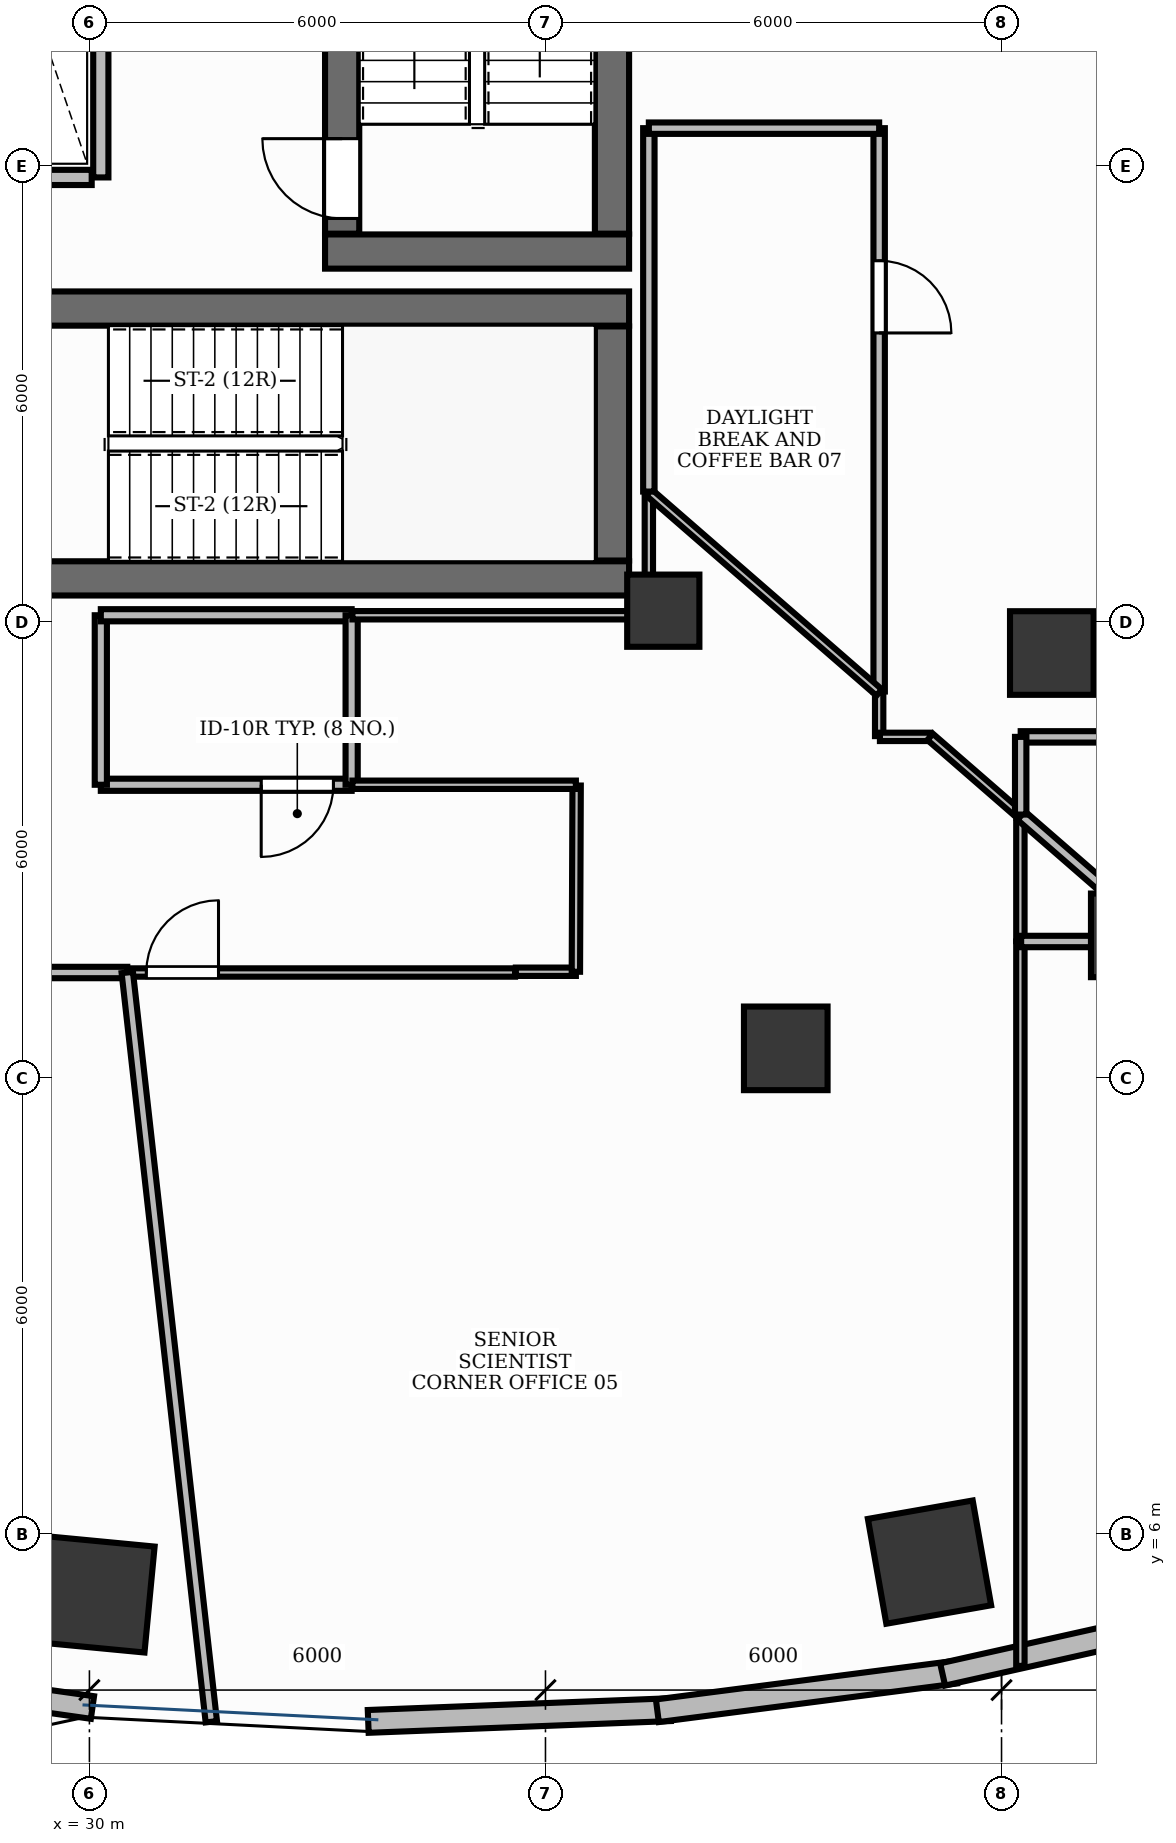
"""IFC4 building model, lengths in metres.
Left out: names, types, materials, properties, quantities, classifications, styles, units other than length and angle.
Written with IfcOpenShell. Run it as: python <this file> out.ifc"""

import sys

from ifc_helpers import new_model, si_unit, direction, frame, frame_2d, origin, origin_2d, place, context, subcontext, project, spatial, rectangle, extrude, element, fill, save


model = new_model("IFC4")
c1 = context("Model", 3, precision=1e-05, world=origin(), true_north=direction((0.0, 1.0)))
c2 = subcontext(c1, "Body", "Model", "MODEL_VIEW")
j1 = project(units=[si_unit("LENGTHUNIT", "METRE"), si_unit("PLANEANGLEUNIT", "RADIAN")], contexts=[c1])
p1 = place(None, origin())
s1 = spatial("IfcSite", under=j1, at=p1, CompositionType="ELEMENT")
p2 = place(p1, origin())
s2 = spatial("IfcBuilding", under=s1, at=p2, CompositionType="ELEMENT")
p3 = place(p2, frame((0.0, 0.0, 76.2)))
s3 = spatial("IfcBuildingStorey", under=s2, at=p3, CompositionType="ELEMENT", Elevation=76.2)
p4 = place(p3, frame((28.852, 18.575, 0.0), z_axis=(0.0, 0.0, 1.0), x_axis=(1.0, 0.0, 0.0)))
e1 = element("IfcWall", 1, at=p4, inside=s3, PredefinedType="SHEAR", context=c2, shape_type="SweptSolid", body=[
    extrude(rectangle(XDim=8.248, YDim=0.45, at=frame_2d((4.124, 0.0))), origin(), (0.0, 0.0, 1.0), 3.9),
])
p5 = place(p3, frame((28.35, 22.125, 0.0), z_axis=(0.0, 0.0, 1.0), x_axis=(1.0, 0.0, 0.0)))
e2 = element("IfcWall", 2, at=p5, inside=s3, PredefinedType="SHEAR", context=c2, shape_type="SweptSolid", body=[
    extrude(rectangle(XDim=8.75, YDim=0.45, at=frame_2d((4.375, 0.0))), origin(), (0.0, 0.0, 1.0), 3.9),
])
p6 = place(p3, frame((36.875, 18.81, 0.0), z_axis=(0.0, 0.0, 1.0), x_axis=(0.0, 1.0, 0.0)))
e3 = element("IfcWall", 3, at=p6, inside=s3, PredefinedType="SHEAR", context=c2, shape_type="SweptSolid", body=[
    extrude(rectangle(XDim=3.08, YDim=0.45, at=frame_2d((1.54, 0.0))), origin(), (0.0, 0.0, 1.0), 3.9),
])
p7 = place(p3, frame((33.1, 22.875, 0.0), z_axis=(0.0, 0.0, 1.0), x_axis=(1.0, 0.0, 0.0)))
e4 = element("IfcWall", 4, at=p7, inside=s3, PredefinedType="SHEAR", context=c2, shape_type="SweptSolid", body=[
    extrude(rectangle(XDim=4.0, YDim=0.45, at=frame_2d((2.0, 0.0))), origin(), (0.0, 0.0, 1.0), 3.9),
])
p8 = place(p3, frame((36.875, 23.11, 0.0), z_axis=(0.0, 0.0, 1.0), x_axis=(0.0, 1.0, 0.0)))
e5 = element("IfcWall", 5, at=p8, inside=s3, PredefinedType="SHEAR", context=c2, shape_type="SweptSolid", body=[
    extrude(rectangle(XDim=7.78, YDim=0.45, at=frame_2d((3.89, 0.0))), origin(), (0.0, 0.0, 1.0), 3.9),
])
p9 = place(p3, frame((33.325, 23.11, 0.0), z_axis=(0.0, 0.0, 1.0), x_axis=(0.0, 1.0, 0.0)))
e6 = element("IfcWall", 6, at=p9, inside=s3, PredefinedType="SHEAR", context=c2, shape_type="SweptSolid", body=[
    extrude(rectangle(XDim=7.78, YDim=0.45, at=frame_2d((3.89, 0.0))), origin(), (0.0, 0.0, 1.0), 3.9),
])
p10 = place(p9, frame((0.2, 0.0, 0.0)))
e7 = element("IfcOpeningElement", 7, at=p10, cuts=e6, PredefinedType="OPENING", context=c2, shape_type="SweptSolid", body=[
    extrude(rectangle(XDim=1.05, YDim=2.15, at=frame_2d((0.525, 1.075))), frame((0.0, 0.24, 0.0), z_axis=(0.0, -1.0, 0.0), x_axis=(1.0, 0.0, 0.0)), (0.0, 0.0, 1.0), 0.48),
])
p11 = place(p3, frame((37.55, 18.15, -0.0), z_axis=(0.0, 0.0, 1.0), x_axis=(1.0, 0.0, 0.0)))
e8 = element("IfcColumn", 8, at=p11, inside=s3, PredefinedType="PILASTER", context=c2, shape_type="SweptSolid", body=[
    extrude(rectangle(XDim=0.95, YDim=0.95, at=origin_2d()), origin(), (0.0, 0.0, 1.0), 3.901),
])
for number, where, z_axis, x_axis in (
    (9, (30.094, 5.208, -0.0), (0.0, 0.0, 1.0), (-0.995, 0.095, 0.0)),
    (10, (41.052, 5.633, -0.0), (0.0, 0.0, 1.0), (0.985, 0.173, 0.0)),
):
    element("IfcColumn", number, at=place(p3, frame(where, z_axis=z_axis, x_axis=x_axis)), inside=s3, PredefinedType="COLUMN", context=c2, shape_type="SweptSolid", body=[
        extrude(rectangle(XDim=1.4, YDim=1.4, at=origin_2d()), origin(), (0.0, 0.0, 1.0), 3.901),
    ])
for number, where, z_axis, x_axis in (
    (11, (39.161, 12.392, -0.0), (0.0, 0.0, 1.0), (1.0, 0.0, 0.0)),
    (12, (43.727, 13.879, -0.0), (0.0, 0.0, 1.0), (1.0, 0.0, 0.0)),
    (13, (42.662, 17.593, -0.0), (0.0, 0.0, 1.0), (1.0, 0.0, 0.0)),
):
    element("IfcColumn", number, at=place(p3, frame(where, z_axis=z_axis, x_axis=x_axis)), inside=s3, PredefinedType="COLUMN", context=c2, shape_type="SweptSolid", body=[
        extrude(rectangle(XDim=1.1, YDim=1.1, at=origin_2d()), origin(), (0.0, 0.0, 1.0), 3.901),
    ])
p12 = place(p3, frame((26.128, 4.273, 0.0), z_axis=(0.0, 0.0, 1.0), x_axis=(0.990165832998, -0.139898617443, 0.0)))
e14 = element("IfcWall", 14, at=p12, inside=s3, PredefinedType="STANDARD", context=c2, shape_type="SweptSolid", body=[
    extrude(rectangle(XDim=3.951, YDim=0.3, at=frame_2d((1.976, 0.0))), origin(), (0.0, 0.0, 1.0), 3.9),
])
p13 = place(p3, frame((33.668, 3.538, 0.0), z_axis=(0.0, 0.0, 1.0), x_axis=(0.999245411623, 0.038840794937, 0.0)))
e15 = element("IfcWall", 15, at=p13, inside=s3, PredefinedType="STANDARD", context=c2, shape_type="SweptSolid", body=[
    extrude(rectangle(XDim=3.979, YDim=0.3, at=frame_2d((1.989, 0.0))), origin(), (0.0, 0.0, 1.0), 3.9),
])
p14 = place(p3, frame((37.472, 3.678, 0.0), z_axis=(0.0, 0.0, 1.0), x_axis=(0.991734095036, 0.128310111617, 0.0)))
e16 = element("IfcWall", 16, at=p14, inside=s3, PredefinedType="STANDARD", context=c2, shape_type="SweptSolid", body=[
    extrude(rectangle(XDim=3.956, YDim=0.3, at=frame_2d((1.978, 0.0))), origin(), (0.0, 0.0, 1.0), 3.9),
])
p15 = place(p3, frame((41.225, 4.155, 0.0), z_axis=(0.0, 0.0, 1.0), x_axis=(0.975868573345, 0.218358713032, 0.0)))
e17 = element("IfcWall", 17, at=p15, inside=s3, PredefinedType="STANDARD", context=c2, shape_type="SweptSolid", body=[
    extrude(rectangle(XDim=3.909, YDim=0.3, at=frame_2d((1.954, 0.0))), origin(), (0.0, 0.0, 1.0), 3.9),
])
p16 = place(p3, frame((30.15, 23.85, 0.0), z_axis=(0.0, 0.0, 1.0), x_axis=(0.0, 1.0, 0.0)))
e18 = element("IfcWall", 18, at=p16, inside=s3, PredefinedType="PARTITIONING", context=c2, shape_type="SweptSolid", body=[
    extrude(rectangle(XDim=6.35, YDim=0.2, at=frame_2d((3.175, 0.0))), origin(), (0.0, 0.0, 1.0), 2.91),
])
p17 = place(p3, frame((27.934, 23.85, 0.0), z_axis=(0.0, 0.0, 1.0), x_axis=(1.0, 0.0, 0.0)))
e19 = element("IfcWall", 19, at=p17, inside=s3, PredefinedType="PARTITIONING", context=c2, shape_type="SweptSolid", body=[
    extrude(rectangle(XDim=2.096, YDim=0.2, at=frame_2d((1.048, 0.0))), origin(), (0.0, 0.0, 1.0), 2.91),
])
p18 = place(p3, frame((33.45, 15.86, 0.0), z_axis=(0.0, 0.0, 1.0), x_axis=(-1.0, 0.0, 0.0)))
e20 = element("IfcWall", 20, at=p18, inside=s3, PredefinedType="PARTITIONING", context=c2, shape_type="SweptSolid", body=[
    extrude(rectangle(XDim=3.3, YDim=0.16, at=frame_2d((1.65, 0.0))), origin(), (0.0, 0.0, 1.0), 2.91),
])
p19 = place(p18, frame((0.24, 0.0, 0.0)))
e21 = element("IfcOpeningElement", 21, at=p19, cuts=e20, PredefinedType="OPENING", context=c2, shape_type="SweptSolid", body=[
    extrude(rectangle(XDim=0.95, YDim=2.15, at=frame_2d((0.475, 1.075))), frame((0.0, 0.095, 0.0), z_axis=(0.0, -1.0, 0.0), x_axis=(1.0, 0.0, 0.0)), (0.0, 0.0, 1.0), 0.19),
])
p20 = place(p3, frame((30.508, 13.39, 0.0), z_axis=(0.0, 0.0, 1.0), x_axis=(1.0, 0.0, 0.0)))
e22 = element("IfcWall", 22, at=p20, inside=s3, PredefinedType="MOVABLE", context=c2, shape_type="SweptSolid", body=[
    extrude(rectangle(XDim=5.092, YDim=0.11, at=frame_2d((2.546, 0.0))), origin(), (0.0, 0.0, 1.0), 2.91),
])
p21 = place(p20, frame((0.24, 0.0, 0.0)))
e23 = element("IfcOpeningElement", 23, at=p21, cuts=e22, PredefinedType="OPENING", context=c2, shape_type="SweptSolid", body=[
    extrude(rectangle(XDim=0.95, YDim=2.15, at=frame_2d((0.475, 1.075))), frame((0.0, 0.07, 0.0), z_axis=(0.0, -1.0, 0.0), x_axis=(1.0, 0.0, 0.0)), (0.0, 0.0, 1.0), 0.14),
])
p22 = place(p3, frame((40.39, 24.498, 0.0), z_axis=(0.0, 0.0, 1.0), x_axis=(0.0, -1.0, 0.0)))
e24 = element("IfcWall", 24, at=p22, inside=s3, PredefinedType="PARTITIONING", context=c2, shape_type="SweptSolid", body=[
    extrude(rectangle(XDim=7.412, YDim=0.15, at=frame_2d((3.706, 0.0))), origin(), (0.0, 0.0, 1.0), 2.91),
])
p23 = place(p22, frame((1.744, 0.0, 0.0)))
e25 = element("IfcOpeningElement", 25, at=p23, cuts=e24, PredefinedType="OPENING", context=c2, shape_type="SweptSolid", body=[
    extrude(rectangle(XDim=0.95, YDim=2.15, at=frame_2d((0.475, 1.075))), frame((0.0, 0.09, 0.0), z_axis=(0.0, -1.0, 0.0), x_axis=(1.0, 0.0, 0.0)), (0.0, 0.0, 1.0), 0.18),
])
p24 = place(p3, frame((30.15, 15.86, 0.0), z_axis=(0.0, 0.0, 1.0), x_axis=(0.0, 1.0, 0.0)))
e26 = element("IfcWall", 26, at=p24, inside=s3, PredefinedType="PARTITIONING", context=c2, shape_type="SweptSolid", body=[
    extrude(rectangle(XDim=2.23, YDim=0.16, at=frame_2d((1.115, 0.0))), origin(), (0.0, 0.0, 1.0), 2.91),
])
p25 = place(p3, frame((30.15, 18.09, 0.0), z_axis=(0.0, 0.0, 1.0), x_axis=(1.0, 0.0, 0.0)))
e27 = element("IfcWall", 27, at=p25, inside=s3, PredefinedType="PARTITIONING", context=c2, shape_type="SweptSolid", body=[
    extrude(rectangle(XDim=3.3, YDim=0.16, at=frame_2d((1.65, 0.0))), origin(), (0.0, 0.0, 1.0), 2.91),
])
p26 = place(p3, frame((33.45, 18.09, 0.0), z_axis=(0.0, 0.0, 1.0), x_axis=(0.0, -1.0, 0.0)))
e28 = element("IfcWall", 28, at=p26, inside=s3, PredefinedType="PARTITIONING", context=c2, shape_type="SweptSolid", body=[
    extrude(rectangle(XDim=2.23, YDim=0.16, at=frame_2d((1.115, 0.0))), origin(), (0.0, 0.0, 1.0), 2.91),
])
p27 = place(p3, frame((28.5, 13.39, 0.0), z_axis=(0.0, 0.0, 1.0), x_axis=(1.0, 0.0, 0.0)))
e29 = element("IfcWall", 29, at=p27, inside=s3, PredefinedType="PARTITIONING", context=c2, shape_type="SweptSolid", body=[
    extrude(rectangle(XDim=1.998, YDim=0.15, at=frame_2d((0.999, 0.0))), origin(), (0.0, 0.0, 1.0), 2.91),
])
p28 = place(p3, frame((30.498, 13.39, 0.0), z_axis=(0.0, 0.0, 1.0), x_axis=(0.11147423436, -0.993767324414, 0.0)))
e30 = element("IfcWall", 30, at=p28, inside=s3, PredefinedType="PARTITIONING", context=c2, shape_type="SweptSolid", body=[
    extrude(rectangle(XDim=9.919, YDim=0.15, at=frame_2d((4.959, 0.0))), origin(), (0.0, 0.0, 1.0), 2.91),
])
p29 = place(p3, frame((40.39, 17.073, 0.0), z_axis=(0.0, 0.0, 1.0), x_axis=(0.0, -1.0, 0.0)))
e31 = element("IfcWall", 31, at=p29, inside=s3, PredefinedType="MOVABLE", context=c2, shape_type="SweptSolid", body=[
    extrude(rectangle(XDim=0.573, YDim=0.11, at=frame_2d((0.287, 0.0))), origin(), (0.0, 0.0, 1.0), 2.91),
])
p30 = place(p3, frame((40.4, 16.49, 0.0), z_axis=(0.0, 0.0, 1.0), x_axis=(1.0, 0.0, 0.0)))
e32 = element("IfcWall", 32, at=p30, inside=s3, PredefinedType="MOVABLE", context=c2, shape_type="SweptSolid", body=[
    extrude(rectangle(XDim=0.661, YDim=0.11, at=frame_2d((0.331, 0.0))), origin(), (0.0, 0.0, 1.0), 2.91),
])
p31 = place(p3, frame((41.061, 16.49, 0.0), z_axis=(0.0, 0.0, 1.0), x_axis=(0.754745866839, -0.656017283682, 0.0)))
e33 = element("IfcWall", 33, at=p31, inside=s3, PredefinedType="MOVABLE", context=c2, shape_type="SweptSolid", body=[
    extrude(rectangle(XDim=1.573, YDim=0.11, at=frame_2d((0.786, 0.0))), origin(), (0.0, 0.0, 1.0), 2.91),
])
p32 = place(p3, frame((42.248, 15.458, 0.0), z_axis=(0.0, 0.0, 1.0), x_axis=(0.0, -1.0, 0.0)))
e34 = element("IfcWall", 34, at=p32, inside=s3, PredefinedType="MOVABLE", context=c2, shape_type="SweptSolid", body=[
    extrude(rectangle(XDim=1.656, YDim=0.11, at=frame_2d((0.828, 0.0))), origin(), (0.0, 0.0, 1.0), 2.91),
])
p33 = place(p3, frame((42.248, 13.798, 0.0), z_axis=(0.0, 0.0, 1.0), x_axis=(0.0, -1.0, 0.0)))
e35 = element("IfcWall", 35, at=p33, inside=s3, PredefinedType="MOVABLE", context=c2, shape_type="SweptSolid", body=[
    extrude(rectangle(XDim=9.53, YDim=0.11, at=frame_2d((4.765, 0.0))), origin(), (0.0, 0.0, 1.0), 2.91),
])
p34 = place(p3, frame((35.61, 13.4, 0.0), z_axis=(0.0, 0.0, 1.0), x_axis=(1.0, 0.0, 0.0)))
e36 = element("IfcWall", 36, at=p34, inside=s3, PredefinedType="MOVABLE", context=c2, shape_type="SweptSolid", body=[
    extrude(rectangle(XDim=0.79, YDim=0.11, at=frame_2d((0.395, 0.0))), origin(), (0.0, 0.0, 1.0), 2.91),
])
p35 = place(p3, frame((36.4, 13.4, 0.0), z_axis=(0.0, 0.0, 1.0), x_axis=(0.004085258855, 0.999991655295, 0.0)))
e37 = element("IfcWall", 37, at=p35, inside=s3, PredefinedType="MOVABLE", context=c2, shape_type="SweptSolid", body=[
    extrude(rectangle(XDim=2.45, YDim=0.11, at=frame_2d((1.225, 0.0))), origin(), (0.0, 0.0, 1.0), 2.91),
])
p36 = place(p3, frame((36.4, 15.86, 0.0), z_axis=(0.0, 0.0, 1.0), x_axis=(-1.0, 0.0, 0.0)))
e38 = element("IfcWall", 38, at=p36, inside=s3, PredefinedType="MOVABLE", context=c2, shape_type="SweptSolid", body=[
    extrude(rectangle(XDim=2.94, YDim=0.11, at=frame_2d((1.47, 0.0))), origin(), (0.0, 0.0, 1.0), 2.91),
])
p37 = place(p3, frame((33.46, 18.09, 0.0), z_axis=(0.0, 0.0, 1.0), x_axis=(1.0, 0.0, 0.0)))
e39 = element("IfcWall", 39, at=p37, inside=s3, PredefinedType="MOVABLE", context=c2, shape_type="SweptSolid", body=[
    extrude(rectangle(XDim=3.89, YDim=0.11, at=frame_2d((1.945, 0.0))), origin(), (0.0, 0.0, 1.0), 2.91),
])
p38 = place(p3, frame((37.36, 18.1, 0.0), z_axis=(0.0, 0.0, 1.0), x_axis=(0.0, 1.0, 0.0)))
e40 = element("IfcWall", 40, at=p38, inside=s3, PredefinedType="MOVABLE", context=c2, shape_type="SweptSolid", body=[
    extrude(rectangle(XDim=1.607, YDim=0.11, at=frame_2d((0.804, 0.0))), origin(), (0.0, 0.0, 1.0), 2.91),
])
p39 = place(p3, frame((37.36, 19.707, 0.0), z_axis=(0.0, 0.0, 1.0), x_axis=(0.754674904971, -0.656098916175, 0.0)))
e41 = element("IfcWall", 41, at=p39, inside=s3, PredefinedType="MOVABLE", context=c2, shape_type="SweptSolid", body=[
    extrude(rectangle(XDim=4.015, YDim=0.11, at=frame_2d((2.007, 0.0))), origin(), (0.0, 0.0, 1.0), 2.91),
])
p40 = place(p3, frame((42.252, 16.49, 0.0), z_axis=(0.0, 0.0, 1.0), x_axis=(1.0, 0.0, 0.0)))
e42 = element("IfcWall", 42, at=p40, inside=s3, PredefinedType="PARTITIONING", context=c2, shape_type="SweptSolid", body=[
    extrude(rectangle(XDim=1.948, YDim=0.15, at=frame_2d((0.974, 0.0))), origin(), (0.0, 0.0, 1.0), 2.91),
])
p41 = place(p3, frame((42.258, 13.798, 0.0), z_axis=(0.0, 0.0, 1.0), x_axis=(1.0, 0.0, 0.0)))
e43 = element("IfcWall", 43, at=p41, inside=s3, PredefinedType="PARTITIONING", context=c2, shape_type="SweptSolid", body=[
    extrude(rectangle(XDim=1.895, YDim=0.15, at=frame_2d((0.948, 0.0))), origin(), (0.0, 0.0, 1.0), 2.91),
])
p42 = place(p3, frame((44.156, 13.805, 0.0), z_axis=(0.0, 0.0, 1.0), x_axis=(-0.754707936706, 0.656060919635, 0.0)))
e44 = element("IfcWall", 44, at=p42, inside=s3, PredefinedType="PARTITIONING", context=c2, shape_type="SweptSolid", body=[
    extrude(rectangle(XDim=2.514, YDim=0.15, at=frame_2d((1.257, 0.0))), origin(), (0.0, 0.0, 1.0), 2.91),
])
p43 = place(p3, frame((42.252, 15.468, 0.0), z_axis=(0.0, 0.0, 1.0), x_axis=(0.0, 1.0, 0.0)))
e45 = element("IfcWall", 45, at=p43, inside=s3, PredefinedType="PARTITIONING", context=c2, shape_type="SweptSolid", body=[
    extrude(rectangle(XDim=1.022, YDim=0.15, at=frame_2d((0.511, 0.0))), origin(), (0.0, 0.0, 1.0), 2.91),
])
p44 = place(p3, frame((37.36, 19.717, 0.0), z_axis=(0.0, 0.0, 1.0), x_axis=(0.0, 1.0, 0.0)))
e46 = element("IfcWall", 46, at=p44, inside=s3, PredefinedType="PARTITIONING", context=c2, shape_type="SweptSolid", body=[
    extrude(rectangle(XDim=4.781, YDim=0.15, at=frame_2d((2.39, 0.0))), origin(), (0.0, 0.0, 1.0), 2.91),
])
p45 = place(p3, frame((37.36, 24.498, 0.0), z_axis=(0.0, 0.0, 1.0), x_axis=(1.0, 0.0, 0.0)))
e47 = element("IfcWall", 47, at=p45, inside=s3, PredefinedType="PARTITIONING", context=c2, shape_type="SweptSolid", body=[
    extrude(rectangle(XDim=3.03, YDim=0.15, at=frame_2d((1.515, 0.0))), origin(), (0.0, 0.0, 1.0), 2.91),
])
p46 = place(p10, origin())
e48 = element("IfcDoor", 48, at=p46, inside=s3, OperationType="SINGLE_SWING_RIGHT", PredefinedType="DOOR", context=c2, shape_type="SweptSolid", body=[
    extrude(rectangle(XDim=1.05, YDim=2.15, at=frame_2d((0.525, 1.075))), frame((0.0, 0.025, 0.0), z_axis=(0.0, -1.0, 0.0), x_axis=(1.0, 0.0, 0.0)), (0.0, 0.0, 1.0), 0.05),
])
fill(e7, e48)
p47 = place(p19, origin())
e49 = element("IfcDoor", 49, at=p47, inside=s3, OperationType="SINGLE_SWING_RIGHT", PredefinedType="DOOR", context=c2, shape_type="SweptSolid", body=[
    extrude(rectangle(XDim=0.95, YDim=2.15, at=frame_2d((0.475, 1.075))), frame((0.0, 0.025, 0.0), z_axis=(0.0, -1.0, 0.0), x_axis=(1.0, 0.0, 0.0)), (0.0, 0.0, 1.0), 0.05),
])
fill(e21, e49)
p48 = place(p21, origin())
e50 = element("IfcDoor", 50, at=p48, inside=s3, OperationType="SINGLE_SWING_RIGHT", PredefinedType="DOOR", context=c2, shape_type="SweptSolid", body=[
    extrude(rectangle(XDim=0.95, YDim=2.15, at=frame_2d((0.475, 1.075))), frame((0.0, 0.025, 0.0), z_axis=(0.0, -1.0, 0.0), x_axis=(1.0, 0.0, 0.0)), (0.0, 0.0, 1.0), 0.05),
])
fill(e23, e50)
p49 = place(p23, origin())
e51 = element("IfcDoor", 51, at=p49, inside=s3, OperationType="SINGLE_SWING_RIGHT", PredefinedType="DOOR", context=c2, shape_type="SweptSolid", body=[
    extrude(rectangle(XDim=0.95, YDim=2.15, at=frame_2d((0.475, 1.075))), frame((0.0, 0.025, 0.0), z_axis=(0.0, -1.0, 0.0), x_axis=(1.0, 0.0, 0.0)), (0.0, 0.0, 1.0), 0.05),
])
fill(e25, e51)
save(model, sys.argv[1])
